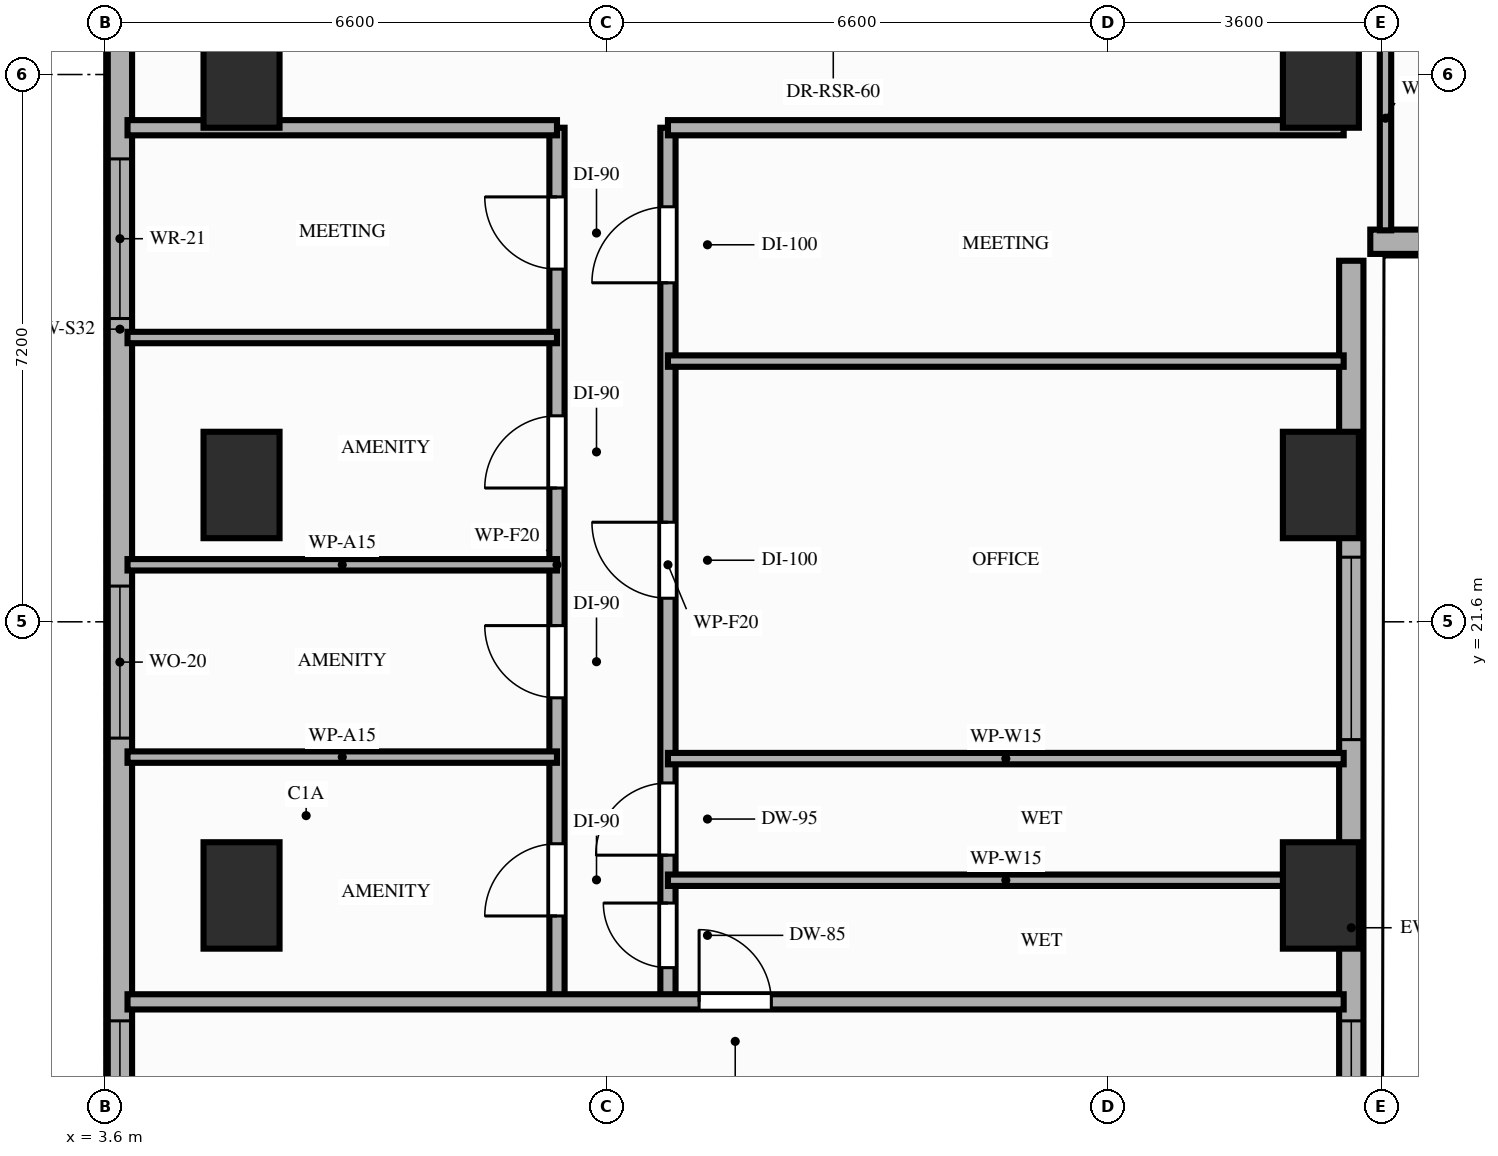
"""IFC4 building model, lengths in metres.
Left out: names, types, materials, properties, quantities, classifications, styles, units other than length and angle.
Written with IfcOpenShell. Run it as: python <this file> out.ifc"""

import sys

from ifc_helpers import new_model, si_unit, direction, frame, frame_2d, origin, origin_2d, place, context, subcontext, project, spatial, rectangle, extrude, element, fill, save


model = new_model("IFC4")
c1 = context("Model", 3, precision=1e-05, world=origin(), true_north=direction((0.0, 1.0)))
c2 = subcontext(c1, "Body", "Model", "MODEL_VIEW")
j1 = project(units=[si_unit("LENGTHUNIT", "METRE"), si_unit("PLANEANGLEUNIT", "RADIAN")], contexts=[c1])
p1 = place(None, origin())
s1 = spatial("IfcSite", under=j1, at=p1, CompositionType="ELEMENT")
p2 = place(p1, origin())
s2 = spatial("IfcBuilding", under=s1, at=p2, CompositionType="ELEMENT")
p3 = place(p2, frame((0.0, 0.0, 62.8)))
s3 = spatial("IfcBuildingStorey", under=s2, at=p3, CompositionType="ELEMENT", Elevation=62.8)
for number, where, z_axis, x_axis in (
    (1, (5.4, 18.0, 0.0), (0.0, 0.0, 1.0), (1.0, 0.0, 0.0)),
    (2, (19.6, 18.0, 0.0), (0.0, 0.0, 1.0), (1.0, 0.0, 0.0)),
    (3, (5.4, 23.4, 0.0), (0.0, 0.0, 1.0), (1.0, 0.0, 0.0)),
    (4, (19.6, 23.4, 0.0), (0.0, 0.0, 1.0), (1.0, 0.0, 0.0)),
    (5, (5.4, 28.8, 0.0), (0.0, 0.0, 1.0), (1.0, 0.0, 0.0)),
    (6, (19.6, 28.8, 0.0), (0.0, 0.0, 1.0), (1.0, 0.0, 0.0)),
):
    element("IfcColumn", number, at=place(p3, frame(where, z_axis=z_axis, x_axis=x_axis)), inside=s3, PredefinedType="COLUMN", context=c2, shape_type="SweptSolid", body=[
        extrude(rectangle(XDim=1.0, YDim=1.4, at=origin_2d()), origin(), (0.0, 0.0, 1.0), 3.2),
    ])
p4 = place(p3, frame((3.8, 42.1, 0.0), z_axis=(0.0, 0.0, 1.0), x_axis=(0.0, -1.0, 0.0)))
e7 = element("IfcWall", 7, at=p4, inside=s3, PredefinedType="STANDARD", context=c2, shape_type="SweptSolid", body=[
    extrude(rectangle(XDim=33.3, YDim=0.32, at=frame_2d((16.65, 0.0))), origin(), (0.0, 0.0, 1.0), 2.7),
])
p5 = place(p4, frame((30.5, 0.0, 0.85)))
e8 = element("IfcOpeningElement", 8, at=p5, cuts=e7, PredefinedType="OPENING", context=c2, shape_type="SweptSolid", body=[
    extrude(rectangle(XDim=2.4, YDim=1.6, at=frame_2d((1.2, 0.8))), frame((0.0, 0.17, 0.0), z_axis=(0.0, -1.0, 0.0), x_axis=(1.0, 0.0, 0.0)), (0.0, 0.0, 1.0), 0.34),
])
p6 = place(p4, frame((25.75, 0.0, 0.85)))
e9 = element("IfcOpeningElement", 9, at=p6, cuts=e7, PredefinedType="OPENING", context=c2, shape_type="SweptSolid", body=[
    extrude(rectangle(XDim=2.4, YDim=1.6, at=frame_2d((1.2, 0.8))), frame((0.0, 0.17, 0.0), z_axis=(0.0, -1.0, 0.0), x_axis=(1.0, 0.0, 0.0)), (0.0, 0.0, 1.0), 0.34),
])
p7 = place(p4, frame((20.03, 0.0, 0.85)))
e10 = element("IfcOpeningElement", 10, at=p7, cuts=e7, PredefinedType="OPENING", context=c2, shape_type="SweptSolid", body=[
    extrude(rectangle(XDim=2.0, YDim=1.6, at=frame_2d((1.0, 0.8))), frame((0.0, 0.17, 0.0), z_axis=(0.0, -1.0, 0.0), x_axis=(1.0, 0.0, 0.0)), (0.0, 0.0, 1.0), 0.34),
])
p8 = place(p4, frame((14.41, 0.0, 0.85)))
e11 = element("IfcOpeningElement", 11, at=p8, cuts=e7, PredefinedType="OPENING", context=c2, shape_type="SweptSolid", body=[
    extrude(rectangle(XDim=2.1, YDim=1.6, at=frame_2d((1.05, 0.8))), frame((0.0, 0.17, 0.0), z_axis=(0.0, -1.0, 0.0), x_axis=(1.0, 0.0, 0.0)), (0.0, 0.0, 1.0), 0.34),
])
p9 = place(p4, frame((9.6, 0.0, 0.85)))
e12 = element("IfcOpeningElement", 12, at=p9, cuts=e7, PredefinedType="OPENING", context=c2, shape_type="SweptSolid", body=[
    extrude(rectangle(XDim=2.4, YDim=1.6, at=frame_2d((1.2, 0.8))), frame((0.0, 0.17, 0.0), z_axis=(0.0, -1.0, 0.0), x_axis=(1.0, 0.0, 0.0)), (0.0, 0.0, 1.0), 0.34),
])
p10 = place(p4, frame((3.5, 0.0, 0.85)))
e13 = element("IfcOpeningElement", 13, at=p10, cuts=e7, PredefinedType="OPENING", context=c2, shape_type="SweptSolid", body=[
    extrude(rectangle(XDim=2.4, YDim=1.6, at=frame_2d((1.2, 0.8))), frame((0.0, 0.17, 0.0), z_axis=(0.0, -1.0, 0.0), x_axis=(1.0, 0.0, 0.0)), (0.0, 0.0, 1.0), 0.34),
])
p11 = place(p3, frame((20.0, 8.8, 0.0), z_axis=(0.0, 0.0, 1.0), x_axis=(0.0, 1.0, 0.0)))
e14 = element("IfcWall", 14, at=p11, inside=s3, PredefinedType="STANDARD", context=c2, shape_type="SweptSolid", body=[
    extrude(rectangle(XDim=17.55, YDim=0.32, at=frame_2d((8.775, 0.0))), origin(), (0.0, 0.0, 1.0), 2.4),
])
p12 = place(p11, frame((5.15, 0.0, 0.85)))
e15 = element("IfcOpeningElement", 15, at=p12, cuts=e14, PredefinedType="OPENING", context=c2, shape_type="SweptSolid", body=[
    extrude(rectangle(XDim=2.4, YDim=1.3, at=frame_2d((1.2, 0.65))), frame((0.0, 0.17, 0.0), z_axis=(0.0, -1.0, 0.0), x_axis=(1.0, 0.0, 0.0)), (0.0, 0.0, 1.0), 0.34),
])
p13 = place(p11, frame((11.25, 0.0, 0.85)))
e16 = element("IfcOpeningElement", 16, at=p13, cuts=e14, PredefinedType="OPENING", context=c2, shape_type="SweptSolid", body=[
    extrude(rectangle(XDim=2.4, YDim=1.3, at=frame_2d((1.2, 0.65))), frame((0.0, 0.17, 0.0), z_axis=(0.0, -1.0, 0.0), x_axis=(1.0, 0.0, 0.0)), (0.0, 0.0, 1.0), 0.34),
])
p14 = place(p3, frame((20.25, 26.6, 0.0), z_axis=(0.0, 0.0, 1.0), x_axis=(1.0, 0.0, 0.0)))
e17 = element("IfcWall", 17, at=p14, inside=s3, PredefinedType="STANDARD", context=c2, shape_type="SweptSolid", body=[
    extrude(rectangle(XDim=26.15, YDim=0.32, at=frame_2d((13.075, 0.0))), origin(), (0.0, 0.0, 1.0), 3.02),
])
p15 = place(p14, frame((8.0, 0.0, 0.0)))
e18 = element("IfcOpeningElement", 18, at=p15, cuts=e17, PredefinedType="OPENING", context=c2, shape_type="SweptSolid", body=[
    extrude(rectangle(XDim=1.3, YDim=2.08, at=frame_2d((0.65, 1.04))), frame((0.0, 0.17, 0.0), z_axis=(0.0, -1.0, 0.0), x_axis=(1.0, 0.0, 0.0)), (0.0, 0.0, 1.0), 0.34),
])
p16 = place(p14, frame((22.5, 0.0, 0.0)))
e19 = element("IfcOpeningElement", 19, at=p16, cuts=e17, PredefinedType="OPENING", context=c2, shape_type="SweptSolid", body=[
    extrude(rectangle(XDim=1.3, YDim=2.08, at=frame_2d((0.65, 1.04))), frame((0.0, 0.17, 0.0), z_axis=(0.0, -1.0, 0.0), x_axis=(1.0, 0.0, 0.0)), (0.0, 0.0, 1.0), 0.34),
])
p17 = place(p14, frame((1.95, 0.0, 0.85)))
e20 = element("IfcOpeningElement", 20, at=p17, cuts=e17, PredefinedType="OPENING", context=c2, shape_type="SweptSolid", body=[
    extrude(rectangle(XDim=2.4, YDim=1.8, at=frame_2d((1.2, 0.9))), frame((0.0, 0.17, 0.0), z_axis=(0.0, -1.0, 0.0), x_axis=(1.0, 0.0, 0.0)), (0.0, 0.0, 1.0), 0.34),
])
p18 = place(p3, frame((9.55, 16.6, 0.0), z_axis=(0.0, 0.0, 1.0), x_axis=(0.0, 1.0, 0.0)))
e21 = element("IfcWall", 21, at=p18, inside=s3, PredefinedType="PARTITIONING", context=c2, shape_type="SweptSolid", body=[
    extrude(rectangle(XDim=11.5, YDim=0.2, at=frame_2d((5.75, 0.0))), origin(), (0.0, 0.0, 1.0), 2.4),
])
p19 = place(p18, frame((1.13, 0.0, 0.0)))
e22 = element("IfcOpeningElement", 22, at=p19, cuts=e21, PredefinedType="OPENING", context=c2, shape_type="SweptSolid", body=[
    extrude(rectangle(XDim=0.95, YDim=2.15, at=frame_2d((0.475, 1.075))), frame((0.0, 0.11, 0.0), z_axis=(0.0, -1.0, 0.0), x_axis=(1.0, 0.0, 0.0)), (0.0, 0.0, 1.0), 0.22),
])
p20 = place(p18, frame((4.0, 0.0, 0.0)))
e23 = element("IfcOpeningElement", 23, at=p20, cuts=e21, PredefinedType="OPENING", context=c2, shape_type="SweptSolid", body=[
    extrude(rectangle(XDim=0.95, YDim=2.15, at=frame_2d((0.475, 1.075))), frame((0.0, 0.11, 0.0), z_axis=(0.0, -1.0, 0.0), x_axis=(1.0, 0.0, 0.0)), (0.0, 0.0, 1.0), 0.22),
])
p21 = place(p18, frame((6.76, 0.0, 0.0)))
e24 = element("IfcOpeningElement", 24, at=p21, cuts=e21, PredefinedType="OPENING", context=c2, shape_type="SweptSolid", body=[
    extrude(rectangle(XDim=0.95, YDim=2.15, at=frame_2d((0.475, 1.075))), frame((0.0, 0.11, 0.0), z_axis=(0.0, -1.0, 0.0), x_axis=(1.0, 0.0, 0.0)), (0.0, 0.0, 1.0), 0.22),
])
p22 = place(p18, frame((9.64, 0.0, 0.0)))
e25 = element("IfcOpeningElement", 25, at=p22, cuts=e21, PredefinedType="OPENING", context=c2, shape_type="SweptSolid", body=[
    extrude(rectangle(XDim=0.95, YDim=2.15, at=frame_2d((0.475, 1.075))), frame((0.0, 0.11, 0.0), z_axis=(0.0, -1.0, 0.0), x_axis=(1.0, 0.0, 0.0)), (0.0, 0.0, 1.0), 0.22),
])
p23 = place(p3, frame((11.01, 16.6, 0.0), z_axis=(0.0, 0.0, 1.0), x_axis=(0.0, 1.0, 0.0)))
e26 = element("IfcWall", 26, at=p23, inside=s3, PredefinedType="PARTITIONING", context=c2, shape_type="SweptSolid", body=[
    extrude(rectangle(XDim=11.5, YDim=0.2, at=frame_2d((5.75, 0.0))), origin(), (0.0, 0.0, 1.0), 2.4),
])
p24 = place(p23, frame((0.45, 0.0, 0.0)))
e27 = element("IfcOpeningElement", 27, at=p24, cuts=e26, PredefinedType="OPENING", context=c2, shape_type="SweptSolid", body=[
    extrude(rectangle(XDim=0.85, YDim=2.1, at=frame_2d((0.425, 1.05))), frame((0.0, 0.11, 0.0), z_axis=(0.0, -1.0, 0.0), x_axis=(1.0, 0.0, 0.0)), (0.0, 0.0, 1.0), 0.22),
])
p25 = place(p23, frame((1.93, 0.0, 0.0)))
e28 = element("IfcOpeningElement", 28, at=p25, cuts=e26, PredefinedType="OPENING", context=c2, shape_type="SweptSolid", body=[
    extrude(rectangle(XDim=0.95, YDim=2.1, at=frame_2d((0.475, 1.05))), frame((0.0, 0.11, 0.0), z_axis=(0.0, -1.0, 0.0), x_axis=(1.0, 0.0, 0.0)), (0.0, 0.0, 1.0), 0.22),
])
p26 = place(p23, frame((5.31, 0.0, 0.0)))
e29 = element("IfcOpeningElement", 29, at=p26, cuts=e26, PredefinedType="OPENING", context=c2, shape_type="SweptSolid", body=[
    extrude(rectangle(XDim=1.0, YDim=2.15, at=frame_2d((0.5, 1.075))), frame((0.0, 0.11, 0.0), z_axis=(0.0, -1.0, 0.0), x_axis=(1.0, 0.0, 0.0)), (0.0, 0.0, 1.0), 0.22),
])
p27 = place(p23, frame((9.46, 0.0, 0.0)))
e30 = element("IfcOpeningElement", 30, at=p27, cuts=e26, PredefinedType="OPENING", context=c2, shape_type="SweptSolid", body=[
    extrude(rectangle(XDim=1.0, YDim=2.15, at=frame_2d((0.5, 1.075))), frame((0.0, 0.11, 0.0), z_axis=(0.0, -1.0, 0.0), x_axis=(1.0, 0.0, 0.0)), (0.0, 0.0, 1.0), 0.22),
])
p28 = place(p3, frame((3.9, 16.6, 0.0), z_axis=(0.0, 0.0, 1.0), x_axis=(1.0, 0.0, 0.0)))
e31 = element("IfcWall", 31, at=p28, inside=s3, PredefinedType="PARTITIONING", context=c2, shape_type="SweptSolid", body=[
    extrude(rectangle(XDim=16.0, YDim=0.2, at=frame_2d((8.0, 0.0))), origin(), (0.0, 0.0, 1.0), 2.4),
])
p29 = place(p28, frame((7.52, 0.0, 0.0)))
e32 = element("IfcOpeningElement", 32, at=p29, cuts=e31, PredefinedType="OPENING", context=c2, shape_type="SweptSolid", body=[
    extrude(rectangle(XDim=0.95, YDim=2.15, at=frame_2d((0.475, 1.075))), frame((0.0, 0.11, 0.0), z_axis=(0.0, -1.0, 0.0), x_axis=(1.0, 0.0, 0.0)), (0.0, 0.0, 1.0), 0.22),
])
p30 = place(p3, frame((3.9, 28.1, 0.0), z_axis=(0.0, 0.0, 1.0), x_axis=(1.0, 0.0, 0.0)))
e33 = element("IfcWall", 33, at=p30, inside=s3, PredefinedType="PARTITIONING", context=c2, shape_type="SweptSolid", body=[
    extrude(rectangle(XDim=5.65, YDim=0.2, at=frame_2d((2.825, 0.0))), origin(), (0.0, 0.0, 1.0), 2.4),
])
p31 = place(p3, frame((11.01, 28.1, 0.0), z_axis=(0.0, 0.0, 1.0), x_axis=(1.0, 0.0, 0.0)))
e34 = element("IfcWall", 34, at=p31, inside=s3, PredefinedType="PARTITIONING", context=c2, shape_type="SweptSolid", body=[
    extrude(rectangle(XDim=8.89, YDim=0.2, at=frame_2d((4.445, 0.0))), origin(), (0.0, 0.0, 1.0), 2.4),
])
p32 = place(p3, frame((20.45, 26.75, 0.0), z_axis=(0.0, 0.0, 1.0), x_axis=(0.0, 1.0, 0.0)))
e35 = element("IfcWall", 35, at=p32, inside=s3, PredefinedType="PARTITIONING", context=c2, shape_type="SweptSolid", body=[
    extrude(rectangle(XDim=2.95, YDim=0.15, at=frame_2d((1.475, 0.0))), origin(), (0.0, 0.0, 1.0), 2.4),
])
for number, where, z_axis, x_axis in (
    (36, (3.9, 19.82, 0.0), (0.0, 0.0, 1.0), (1.0, 0.0, 0.0)),
    (37, (3.9, 22.35, 0.0), (0.0, 0.0, 1.0), (1.0, 0.0, 0.0)),
    (38, (3.9, 25.34, 0.0), (0.0, 0.0, 1.0), (1.0, 0.0, 0.0)),
):
    element("IfcWall", number, at=place(p3, frame(where, z_axis=z_axis, x_axis=x_axis)), inside=s3, PredefinedType="PARTITIONING", context=c2, shape_type="SweptSolid", body=[
        extrude(rectangle(XDim=5.65, YDim=0.15, at=frame_2d((2.825, 0.0))), origin(), (0.0, 0.0, 1.0), 2.4),
    ])
for number, where, z_axis, x_axis in (
    (39, (11.01, 18.2, 0.0), (0.0, 0.0, 1.0), (1.0, 0.0, 0.0)),
    (40, (11.01, 19.8, 0.0), (0.0, 0.0, 1.0), (1.0, 0.0, 0.0)),
    (41, (11.01, 25.03, 0.0), (0.0, 0.0, 1.0), (1.0, 0.0, 0.0)),
):
    element("IfcWall", number, at=place(p3, frame(where, z_axis=z_axis, x_axis=x_axis)), inside=s3, PredefinedType="PARTITIONING", context=c2, shape_type="SweptSolid", body=[
        extrude(rectangle(XDim=8.89, YDim=0.15, at=frame_2d((4.445, 0.0))), origin(), (0.0, 0.0, 1.0), 2.4),
    ])
p33 = place(p6, origin())
e42 = element("IfcWindow", 42, at=p33, inside=s3, PartitioningType="SINGLE_PANEL", PredefinedType="WINDOW", context=c2, shape_type="SweptSolid", body=[
    extrude(rectangle(XDim=2.4, YDim=1.6, at=frame_2d((1.2, 0.8))), frame((0.0, 0.03, 0.0), z_axis=(0.0, -1.0, 0.0), x_axis=(1.0, 0.0, 0.0)), (0.0, 0.0, 1.0), 0.06),
])
fill(e9, e42)
p34 = place(p7, origin())
e43 = element("IfcWindow", 43, at=p34, inside=s3, PartitioningType="SINGLE_PANEL", PredefinedType="WINDOW", context=c2, shape_type="SweptSolid", body=[
    extrude(rectangle(XDim=2.0, YDim=1.6, at=frame_2d((1.0, 0.8))), frame((0.0, 0.03, 0.0), z_axis=(0.0, -1.0, 0.0), x_axis=(1.0, 0.0, 0.0)), (0.0, 0.0, 1.0), 0.06),
])
fill(e10, e43)
p35 = place(p8, origin())
e44 = element("IfcWindow", 44, at=p35, inside=s3, PartitioningType="SINGLE_PANEL", PredefinedType="WINDOW", context=c2, shape_type="SweptSolid", body=[
    extrude(rectangle(XDim=2.1, YDim=1.6, at=frame_2d((1.05, 0.8))), frame((0.0, 0.03, 0.0), z_axis=(0.0, -1.0, 0.0), x_axis=(1.0, 0.0, 0.0)), (0.0, 0.0, 1.0), 0.06),
])
fill(e11, e44)
p36 = place(p12, origin())
e45 = element("IfcWindow", 45, at=p36, inside=s3, PartitioningType="SINGLE_PANEL", PredefinedType="WINDOW", context=c2, shape_type="SweptSolid", body=[
    extrude(rectangle(XDim=2.4, YDim=1.3, at=frame_2d((1.2, 0.65))), frame((0.0, 0.03, 0.0), z_axis=(0.0, -1.0, 0.0), x_axis=(1.0, 0.0, 0.0)), (0.0, 0.0, 1.0), 0.06),
])
fill(e15, e45)
p37 = place(p13, origin())
e46 = element("IfcWindow", 46, at=p37, inside=s3, PartitioningType="SINGLE_PANEL", PredefinedType="WINDOW", context=c2, shape_type="SweptSolid", body=[
    extrude(rectangle(XDim=2.4, YDim=1.3, at=frame_2d((1.2, 0.65))), frame((0.0, 0.03, 0.0), z_axis=(0.0, -1.0, 0.0), x_axis=(1.0, 0.0, 0.0)), (0.0, 0.0, 1.0), 0.06),
])
fill(e16, e46)
p38 = place(p19, origin())
e47 = element("IfcDoor", 47, at=p38, inside=s3, OperationType="SINGLE_SWING_LEFT", PredefinedType="DOOR", context=c2, shape_type="SweptSolid", body=[
    extrude(rectangle(XDim=0.95, YDim=2.15, at=frame_2d((0.475, 1.075))), frame((0.0, 0.025, 0.0), z_axis=(0.0, -1.0, 0.0), x_axis=(1.0, 0.0, 0.0)), (0.0, 0.0, 1.0), 0.05),
])
fill(e22, e47)
p39 = place(p20, origin())
e48 = element("IfcDoor", 48, at=p39, inside=s3, OperationType="SINGLE_SWING_RIGHT", PredefinedType="DOOR", context=c2, shape_type="SweptSolid", body=[
    extrude(rectangle(XDim=0.95, YDim=2.15, at=frame_2d((0.475, 1.075))), frame((0.0, 0.025, 0.0), z_axis=(0.0, -1.0, 0.0), x_axis=(1.0, 0.0, 0.0)), (0.0, 0.0, 1.0), 0.05),
])
fill(e23, e48)
p40 = place(p21, origin())
e49 = element("IfcDoor", 49, at=p40, inside=s3, OperationType="SINGLE_SWING_LEFT", PredefinedType="DOOR", context=c2, shape_type="SweptSolid", body=[
    extrude(rectangle(XDim=0.95, YDim=2.15, at=frame_2d((0.475, 1.075))), frame((0.0, 0.025, 0.0), z_axis=(0.0, -1.0, 0.0), x_axis=(1.0, 0.0, 0.0)), (0.0, 0.0, 1.0), 0.05),
])
fill(e24, e49)
p41 = place(p22, origin())
e50 = element("IfcDoor", 50, at=p41, inside=s3, OperationType="SINGLE_SWING_RIGHT", PredefinedType="DOOR", context=c2, shape_type="SweptSolid", body=[
    extrude(rectangle(XDim=0.95, YDim=2.15, at=frame_2d((0.475, 1.075))), frame((0.0, 0.025, 0.0), z_axis=(0.0, -1.0, 0.0), x_axis=(1.0, 0.0, 0.0)), (0.0, 0.0, 1.0), 0.05),
])
fill(e25, e50)
p42 = place(p29, origin())
e51 = element("IfcDoor", 51, at=p42, inside=s3, OperationType="SINGLE_SWING_LEFT", PredefinedType="DOOR", context=c2, shape_type="SweptSolid", body=[
    extrude(rectangle(XDim=0.95, YDim=2.15, at=frame_2d((0.475, 1.075))), frame((0.0, 0.025, 0.0), z_axis=(0.0, -1.0, 0.0), x_axis=(1.0, 0.0, 0.0)), (0.0, 0.0, 1.0), 0.05),
])
fill(e32, e51)
p43 = place(p24, origin())
e52 = element("IfcDoor", 52, at=p43, inside=s3, OperationType="SINGLE_SWING_RIGHT", PredefinedType="DOOR", context=c2, shape_type="SweptSolid", body=[
    extrude(rectangle(XDim=0.85, YDim=2.1, at=frame_2d((0.425, 1.05))), frame((0.0, 0.025, 0.0), z_axis=(0.0, -1.0, 0.0), x_axis=(1.0, 0.0, 0.0)), (0.0, 0.0, 1.0), 0.05),
])
fill(e27, e52)
p44 = place(p25, origin())
e53 = element("IfcDoor", 53, at=p44, inside=s3, OperationType="SINGLE_SWING_LEFT", PredefinedType="DOOR", context=c2, shape_type="SweptSolid", body=[
    extrude(rectangle(XDim=0.95, YDim=2.1, at=frame_2d((0.475, 1.05))), frame((0.0, 0.025, 0.0), z_axis=(0.0, -1.0, 0.0), x_axis=(1.0, 0.0, 0.0)), (0.0, 0.0, 1.0), 0.05),
])
fill(e28, e53)
p45 = place(p26, origin())
e54 = element("IfcDoor", 54, at=p45, inside=s3, OperationType="SINGLE_SWING_RIGHT", PredefinedType="DOOR", context=c2, shape_type="SweptSolid", body=[
    extrude(rectangle(XDim=1.0, YDim=2.15, at=frame_2d((0.5, 1.075))), frame((0.0, 0.025, 0.0), z_axis=(0.0, -1.0, 0.0), x_axis=(1.0, 0.0, 0.0)), (0.0, 0.0, 1.0), 0.05),
])
fill(e29, e54)
p46 = place(p27, origin())
e55 = element("IfcDoor", 55, at=p46, inside=s3, OperationType="SINGLE_SWING_LEFT", PredefinedType="DOOR", context=c2, shape_type="SweptSolid", body=[
    extrude(rectangle(XDim=1.0, YDim=2.15, at=frame_2d((0.5, 1.075))), frame((0.0, 0.025, 0.0), z_axis=(0.0, -1.0, 0.0), x_axis=(1.0, 0.0, 0.0)), (0.0, 0.0, 1.0), 0.05),
])
fill(e30, e55)
save(model, sys.argv[1])
